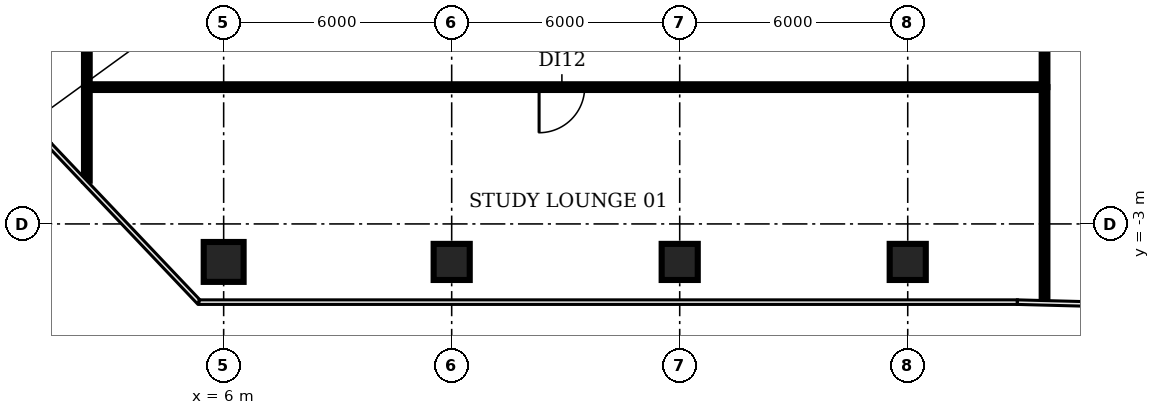
"""IFC4 building model, lengths in metres.
Left out: names, types, materials, properties, quantities, classifications, styles, units other than length and angle.
Written with IfcOpenShell. Run it as: python <this file> out.ifc"""

import sys

from ifc_helpers import new_model, si_unit, direction, frame, frame_2d, origin, origin_2d, place, context, subcontext, project, spatial, rectangle, circle, extrude, element, fill, save


model = new_model("IFC4")
c1 = context("Model", 3, precision=1e-05, world=origin(), true_north=direction((0.0, 1.0)))
c2 = subcontext(c1, "Body", "Model", "MODEL_VIEW")
j1 = project(units=[si_unit("LENGTHUNIT", "METRE"), si_unit("PLANEANGLEUNIT", "RADIAN")], contexts=[c1])
p1 = place(None, origin())
s1 = spatial("IfcSite", under=j1, at=p1, CompositionType="ELEMENT")
p2 = place(p1, origin())
s2 = spatial("IfcBuilding", under=s1, at=p2, CompositionType="ELEMENT")
p3 = place(p2, frame((0.0, 0.0, 45.8)))
s3 = spatial("IfcBuildingStorey", under=s2, at=p3, CompositionType="ELEMENT", Elevation=45.8)
p4 = place(p3, frame((6.0, -4.0, 0.0), z_axis=(0.0, 0.0, 1.0), x_axis=(1.0, 0.0, 0.0)))
e1 = element("IfcColumn", 1, at=p4, inside=s3, PredefinedType="COLUMN", context=c2, shape_type="SweptSolid", body=[
    extrude(circle(Radius=0.525, at=origin_2d()), origin(), (0.0, 0.0, 1.0), 3.85),
])
for number, where, z_axis, x_axis in (
    (2, (12.0, -4.0, 0.0), (0.0, 0.0, 1.0), (1.0, 0.0, 0.0)),
    (3, (18.0, -4.0, 0.0), (0.0, 0.0, 1.0), (1.0, 0.0, 0.0)),
    (4, (24.0, -4.0, 0.0), (0.0, 0.0, 1.0), (1.0, 0.0, 0.0)),
):
    element("IfcColumn", number, at=place(p3, frame(where, z_axis=z_axis, x_axis=x_axis)), inside=s3, PredefinedType="COLUMN", context=c2, shape_type="SweptSolid", body=[
        extrude(rectangle(XDim=0.95, YDim=0.95, at=origin_2d()), origin(), (0.0, 0.0, 1.0), 3.85),
    ])
p5 = place(p3, frame((2.4, -1.862, 0.0), z_axis=(0.0, 0.0, 1.0), x_axis=(0.0, 1.0, 0.0)))
e5 = element("IfcWall", 5, at=p5, inside=s3, PredefinedType="PARTITIONING", context=c2, shape_type="SweptSolid", body=[
    extrude(rectangle(XDim=2.462, YDim=0.15, at=frame_2d((1.231, 0.0))), origin(), (0.0, 0.0, 1.0), 2.83),
])
p6 = place(p3, frame((2.4, 0.6, 0.0), z_axis=(0.0, 0.0, 1.0), x_axis=(0.0, 1.0, 0.0)))
e6 = element("IfcWall", 6, at=p6, inside=s3, PredefinedType="PARTITIONING", context=c2, shape_type="SweptSolid", body=[
    extrude(rectangle(XDim=3.9, YDim=0.15, at=frame_2d((1.95, 0.0))), origin(), (0.0, 0.0, 1.0), 2.83),
])
p7 = place(p3, frame((27.6, -5.01, 0.0), z_axis=(0.0, 0.0, 1.0), x_axis=(0.0, 1.0, 0.0)))
e7 = element("IfcWall", 7, at=p7, inside=s3, PredefinedType="PARTITIONING", context=c2, shape_type="SweptSolid", body=[
    extrude(rectangle(XDim=5.61, YDim=0.15, at=frame_2d((2.805, 0.0))), origin(), (0.0, 0.0, 1.0), 2.83),
])
p8 = place(p3, frame((27.6, 0.6, 0.0), z_axis=(0.0, 0.0, 1.0), x_axis=(-1.0, 0.0, 0.0)))
e8 = element("IfcWall", 8, at=p8, inside=s3, PredefinedType="PARTITIONING", context=c2, shape_type="SweptSolid", body=[
    extrude(rectangle(XDim=25.2, YDim=0.15, at=frame_2d((12.6, 0.0))), origin(), (0.0, 0.0, 1.0), 2.83),
])
p9 = place(p8, frame((12.1, 0.0, 0.0)))
e9 = element("IfcOpeningElement", 9, at=p9, cuts=e8, PredefinedType="OPENING", context=c2, shape_type="SweptSolid", body=[
    extrude(rectangle(XDim=1.2, YDim=2.1, at=frame_2d((0.6, 1.05))), frame((0.0, 0.085, 0.0), z_axis=(0.0, -1.0, 0.0), x_axis=(1.0, 0.0, 0.0)), (0.0, 0.0, 1.0), 0.17),
])
p10 = place(p3, frame((27.6, 0.6, 0.0), z_axis=(0.0, 0.0, 1.0), x_axis=(0.0, 1.0, 0.0)))
e10 = element("IfcWall", 10, at=p10, inside=s3, PredefinedType="PARTITIONING", context=c2, shape_type="SweptSolid", body=[
    extrude(rectangle(XDim=3.9, YDim=0.15, at=frame_2d((1.95, 0.0))), origin(), (0.0, 0.0, 1.0), 2.83),
])
p11 = place(p9, origin())
e11 = element("IfcDoor", 11, at=p11, inside=s3, OperationType="SINGLE_SWING_RIGHT", PredefinedType="DOOR", context=c2, shape_type="SweptSolid", body=[
    extrude(rectangle(XDim=1.2, YDim=2.1, at=frame_2d((0.6, 1.05))), frame((0.0, 0.025, 0.0), z_axis=(0.0, -1.0, 0.0), x_axis=(1.0, 0.0, 0.0)), (0.0, 0.0, 1.0), 0.05),
])
fill(e9, e11)
save(model, sys.argv[1])
